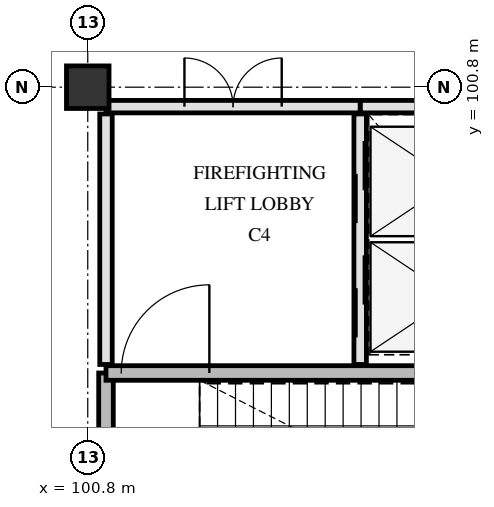
"""IFC4 building model, lengths in metres.
Left out: names, types, materials, properties, quantities, classifications, styles, units other than length and angle.
Written with IfcOpenShell. Run it as: python <this file> out.ifc"""

import sys

from ifc_helpers import new_model, si_unit, direction, frame, frame_2d, origin, origin_2d, place, context, subcontext, project, spatial, rectangle, extrude, element, fill, save


model = new_model("IFC4")
c1 = context("Model", 3, precision=1e-05, world=origin(), true_north=direction((0.0, 1.0)))
c2 = subcontext(c1, "Body", "Model", "MODEL_VIEW")
j1 = project(units=[si_unit("LENGTHUNIT", "METRE"), si_unit("PLANEANGLEUNIT", "RADIAN")], contexts=[c1])
p1 = place(None, origin())
s1 = spatial("IfcSite", under=j1, at=p1, CompositionType="ELEMENT")
p2 = place(p1, origin())
s2 = spatial("IfcBuilding", under=s1, at=p2, CompositionType="ELEMENT")
p3 = place(p2, frame((0.0, 0.0, 14.4)))
s3 = spatial("IfcBuildingStorey", under=s2, at=p3, CompositionType="ELEMENT", Elevation=14.4)
p4 = place(p3, frame((100.8, 100.8, 0.0), z_axis=(0.0, 0.0, 1.0), x_axis=(1.0, 0.0, 0.0)))
e1 = element("IfcColumn", 1, at=p4, inside=s3, PredefinedType="COLUMN", context=c2, shape_type="SweptSolid", body=[
    extrude(rectangle(XDim=0.7, YDim=0.7, at=origin_2d()), origin(), (0.0, 0.0, 1.0), 4.2),
])
p5 = place(p3, frame((101.1, 92.78, 0.0), z_axis=(0.0, 0.0, 1.0), x_axis=(0.0, 1.0, 0.0)))
e2 = element("IfcWall", 2, at=p5, inside=s3, PredefinedType="SHEAR", context=c2, shape_type="SweptSolid", body=[
    extrude(rectangle(XDim=3.32, YDim=0.24, at=frame_2d((1.66, 0.0))), origin(), (0.0, 0.0, 1.0), 3.9),
])
p6 = place(p3, frame((101.1, 96.1, 0.0), z_axis=(0.0, 0.0, 1.0), x_axis=(1.0, 0.0, 0.0)))
e3 = element("IfcWall", 3, at=p6, inside=s3, PredefinedType="SHEAR", context=c2, shape_type="SweptSolid", body=[
    extrude(rectangle(XDim=7.82, YDim=0.24, at=frame_2d((3.91, 0.0))), origin(), (0.0, 0.0, 1.0), 3.9),
])
p7 = place(p6, frame((0.25, 0.0, 0.0)))
e4 = element("IfcOpeningElement", 4, at=p7, cuts=e3, PredefinedType="OPENING", context=c2, shape_type="SweptSolid", body=[
    extrude(rectangle(XDim=1.45, YDim=2.2, at=frame_2d((0.725, 1.1))), frame((0.0, 0.13, 0.0), z_axis=(0.0, -1.0, 0.0), x_axis=(1.0, 0.0, 0.0)), (0.0, 0.0, 1.0), 0.26),
])
p8 = place(p3, frame((105.28, 96.24, 0.0), z_axis=(0.0, 0.0, 1.0), x_axis=(0.0, 1.0, 0.0)))
e5 = element("IfcWall", 5, at=p8, inside=s3, PredefinedType="PARTITIONING", context=c2, shape_type="SweptSolid", body=[
    extrude(rectangle(XDim=4.12, YDim=0.205, at=frame_2d((2.06, 0.0))), origin(), (0.0, 0.0, 1.0), 3.89),
])
p9 = place(p8, frame((0.445, 0.0, 0.0)))
e6 = element("IfcOpeningElement", 6, at=p9, cuts=e5, PredefinedType="OPENING", context=c2, shape_type="SweptSolid", body=[
    extrude(rectangle(XDim=1.35, YDim=2.2, at=frame_2d((0.675, 1.1))), frame((0.0, 0.113, 0.0), z_axis=(0.0, -1.0, 0.0), x_axis=(1.0, 0.0, 0.0)), (0.0, 0.0, 1.0), 0.225),
])
p10 = place(p8, frame((2.325, 0.0, 0.0)))
e7 = element("IfcOpeningElement", 7, at=p10, cuts=e5, PredefinedType="OPENING", context=c2, shape_type="SweptSolid", body=[
    extrude(rectangle(XDim=1.35, YDim=2.2, at=frame_2d((0.675, 1.1))), frame((0.0, 0.113, 0.0), z_axis=(0.0, -1.0, 0.0), x_axis=(1.0, 0.0, 0.0)), (0.0, 0.0, 1.0), 0.225),
])
p11 = place(p3, frame((105.28, 100.48, 0.0), z_axis=(0.0, 0.0, 1.0), x_axis=(1.0, 0.0, 0.0)))
e8 = element("IfcWall", 8, at=p11, inside=s3, PredefinedType="PARTITIONING", context=c2, shape_type="SweptSolid", body=[
    extrude(rectangle(XDim=3.57, YDim=0.205, at=frame_2d((1.785, 0.0))), origin(), (0.0, 0.0, 1.0), 3.29),
])
p12 = place(p3, frame((101.1, 96.24, 0.0), z_axis=(0.0, 0.0, 1.0), x_axis=(0.0, 1.0, 0.0)))
e9 = element("IfcWall", 9, at=p12, inside=s3, PredefinedType="PARTITIONING", context=c2, shape_type="SweptSolid", body=[
    extrude(rectangle(XDim=4.12, YDim=0.205, at=frame_2d((2.06, 0.0))), origin(), (0.0, 0.0, 1.0), 2.69),
])
p13 = place(p3, frame((101.1, 100.48, 0.0), z_axis=(0.0, 0.0, 1.0), x_axis=(1.0, 0.0, 0.0)))
e10 = element("IfcWall", 10, at=p13, inside=s3, PredefinedType="PARTITIONING", context=c2, shape_type="SweptSolid", body=[
    extrude(rectangle(XDim=4.18, YDim=0.205, at=frame_2d((2.09, 0.0))), origin(), (0.0, 0.0, 1.0), 2.69),
])
p14 = place(p13, frame((1.29, 0.0, 0.0)))
e11 = element("IfcOpeningElement", 11, at=p14, cuts=e10, PredefinedType="OPENING", context=c2, shape_type="SweptSolid", body=[
    extrude(rectangle(XDim=1.6, YDim=2.25, at=frame_2d((0.8, 1.125))), frame((0.0, 0.113, 0.0), z_axis=(0.0, -1.0, 0.0), x_axis=(1.0, 0.0, 0.0)), (0.0, 0.0, 1.0), 0.225),
])
p15 = place(p7, origin())
e12 = element("IfcDoor", 12, at=p15, inside=s3, OperationType="SINGLE_SWING_RIGHT", PredefinedType="DOOR", context=c2, shape_type="SweptSolid", body=[
    extrude(rectangle(XDim=1.45, YDim=2.2, at=frame_2d((0.725, 1.1))), frame((0.0, 0.025, 0.0), z_axis=(0.0, -1.0, 0.0), x_axis=(1.0, 0.0, 0.0)), (0.0, 0.0, 1.0), 0.05),
])
fill(e4, e12)
p16 = place(p9, origin())
e13 = element("IfcDoor", 13, at=p16, inside=s3, OperationType="SLIDING_TO_LEFT", PredefinedType="DOOR", context=c2, shape_type="SweptSolid", body=[
    extrude(rectangle(XDim=1.35, YDim=2.2, at=frame_2d((0.675, 1.1))), frame((0.0, 0.025, 0.0), z_axis=(0.0, -1.0, 0.0), x_axis=(1.0, 0.0, 0.0)), (0.0, 0.0, 1.0), 0.05),
])
fill(e6, e13)
p17 = place(p10, origin())
e14 = element("IfcDoor", 14, at=p17, inside=s3, OperationType="SLIDING_TO_LEFT", PredefinedType="DOOR", context=c2, shape_type="SweptSolid", body=[
    extrude(rectangle(XDim=1.35, YDim=2.2, at=frame_2d((0.675, 1.1))), frame((0.0, 0.025, 0.0), z_axis=(0.0, -1.0, 0.0), x_axis=(1.0, 0.0, 0.0)), (0.0, 0.0, 1.0), 0.05),
])
fill(e7, e14)
p18 = place(p14, origin())
e15 = element("IfcDoor", 15, at=p18, inside=s3, OperationType="DOUBLE_SWING_LEFT", PredefinedType="DOOR", context=c2, shape_type="SweptSolid", body=[
    extrude(rectangle(XDim=1.6, YDim=2.25, at=frame_2d((0.8, 1.125))), frame((0.0, 0.025, 0.0), z_axis=(0.0, -1.0, 0.0), x_axis=(1.0, 0.0, 0.0)), (0.0, 0.0, 1.0), 0.05),
])
fill(e11, e15)
save(model, sys.argv[1])
